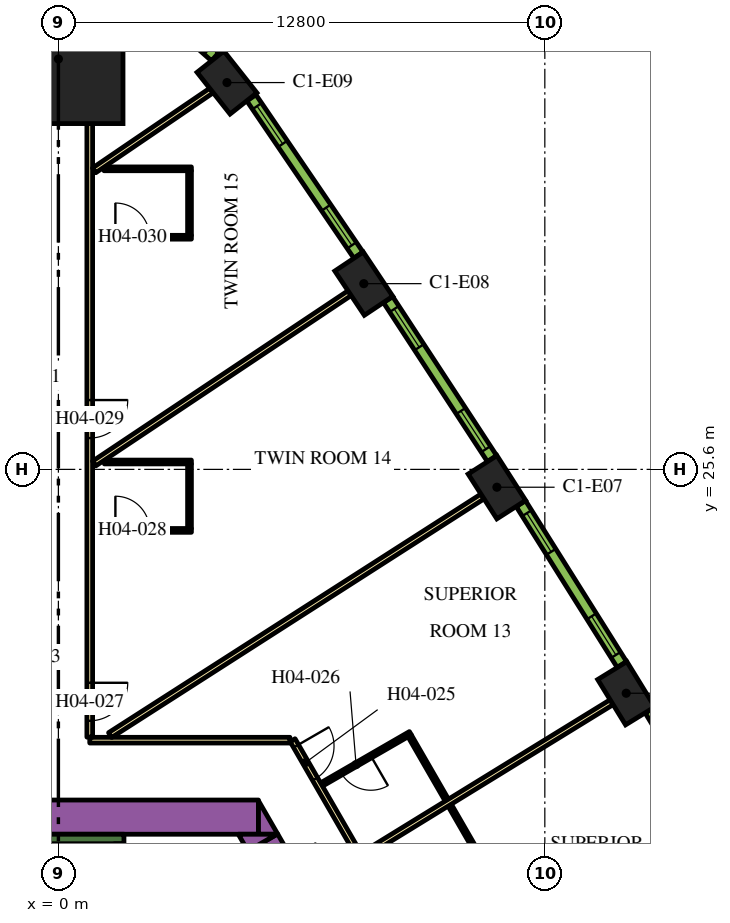
"""IFC4 building model, lengths in metres.
Left out: names, types, materials, properties, quantities, classifications, styles, units other than length and angle.
Written with IfcOpenShell. Run it as: python <this file> out.ifc"""

import sys

from ifc_helpers import new_model, si_unit, direction, frame, frame_2d, origin, origin_2d, place, context, subcontext, project, spatial, polyline, rectangle, outline, extrude, element, fill, save


model = new_model("IFC4")
c1 = context("Model", 3, precision=1e-05, world=origin(), true_north=direction((0.0, 1.0)))
c2 = subcontext(c1, "Body", "Model", "MODEL_VIEW")
j1 = project(units=[si_unit("LENGTHUNIT", "METRE"), si_unit("PLANEANGLEUNIT", "RADIAN")], contexts=[c1])
p1 = place(None, origin())
s1 = spatial("IfcSite", under=j1, at=p1, CompositionType="ELEMENT")
p2 = place(p1, origin())
s2 = spatial("IfcBuilding", under=s1, at=p2, CompositionType="ELEMENT")
p3 = place(p2, frame((0.0, 0.0, 70.5)))
s3 = spatial("IfcBuildingStorey", under=s2, at=p3, CompositionType="ELEMENT", Elevation=70.5)
p4 = place(p3, frame((0.0, 36.399, 0.0), z_axis=(0.0, 0.0, 1.0), x_axis=(0.0, 1.0, 0.0)))
e1 = element("IfcColumn", 1, at=p4, inside=s3, PredefinedType="COLUMN", context=c2, shape_type="SweptSolid", body=[
    extrude(rectangle(XDim=3.4, YDim=3.4, at=origin_2d()), origin(), (0.0, 0.0, 1.0), 3.9),
])
for number, where, z_axis, x_axis in (
    (2, (14.942, 19.71, 0.0), (0.0, 0.0, 1.0), (-0.524, 0.852, 0.0)),
    (3, (11.539, 25.131, 0.0), (0.0, 0.0, 1.0), (-0.539, 0.842, 0.0)),
    (4, (8.037, 30.487, 0.0), (0.0, 0.0, 1.0), (-0.555, 0.832, 0.0)),
    (5, (4.436, 35.778, 0.0), (0.0, 0.0, 1.0), (-0.62, 0.784, 0.0)),
):
    element("IfcColumn", number, at=place(p3, frame(where, z_axis=z_axis, x_axis=x_axis)), inside=s3, PredefinedType="COLUMN", context=c2, shape_type="SweptSolid", body=[
        extrude(rectangle(XDim=1.4, YDim=0.9, at=origin_2d()), origin(), (0.0, 0.0, 1.0), 3.9),
    ])
p5 = place(p3, frame((-4.224, 16.45, 0.0), z_axis=(0.0, 0.0, 1.0), x_axis=(1.0, 0.0, 0.0)))
e6 = element("IfcWall", 6, at=p5, inside=s3, PredefinedType="SOLIDWALL", context=c2, shape_type="SweptSolid", body=[
    extrude(rectangle(XDim=9.488, YDim=0.9, at=frame_2d((4.744, 0.0))), origin(), (0.0, 0.0, 1.0), 3.9),
])
p6 = place(p3, origin())
e7 = element("IfcWall", 7, at=p6, inside=s3, PredefinedType="SOLIDWALL", context=c2, shape_type="SweptSolid", body=[
    extrude(outline(polyline([(5.265, 16.0), (5.265, 16.88), (5.773, 16.0), (5.265, 16.0)])), origin(), (0.0, 0.0, 1.0), 3.9),
])
p7 = place(p3, frame((5.611, 15.382, 0.0), z_axis=(0.0, 0.0, 1.0), x_axis=(-0.500102178127, 0.865966403178, 0.0)))
e8 = element("IfcWall", 8, at=p7, inside=s3, PredefinedType="SOLIDWALL", context=c2, shape_type="SweptSolid", body=[
    extrude(rectangle(XDim=0.464, YDim=0.9, at=frame_2d((0.232, 0.0))), origin(), (0.0, 0.0, 1.0), 3.9),
])
e9 = element("IfcWall", 9, at=p6, inside=s3, PredefinedType="SOLIDWALL", context=c2, shape_type="SweptSolid", body=[
    extrude(outline(polyline([(4.734, 16.0), (5.75, 16.0), (4.988, 15.56), (4.734, 16.0)])), origin(), (0.0, 0.0, 1.0), 3.9),
])
p8 = place(p3, frame((-1.725, 15.875, 0.0), z_axis=(0.0, 0.0, 1.0), x_axis=(1.0, 0.0, 0.0)))
e10 = element("IfcWall", 10, at=p8, inside=s3, PredefinedType="SOLIDWALL", context=c2, shape_type="SweptSolid", body=[
    extrude(rectangle(XDim=3.45, YDim=0.25, at=frame_2d((1.725, 0.0))), origin(), (0.0, 0.0, 1.0), 3.9),
])
p9 = place(p3, frame((6.163, 18.475, 0.0), z_axis=(0.0, 0.0, 1.0), x_axis=(0.500001317485, -0.866024643133, 0.0)))
e11 = element("IfcWall", 11, at=p9, inside=s3, PredefinedType="PARTITIONING", context=c2, shape_type="SweptSolid", body=[
    extrude(rectangle(XDim=25.767, YDim=0.15, at=frame_2d((12.883, 0.0))), origin(), (0.0, 0.0, 1.0), 2.75),
])
p10 = place(p9, frame((21.138, 0.0, 0.0)))
e12 = element("IfcOpeningElement", 12, at=p10, cuts=e11, PredefinedType="OPENING", context=c2, shape_type="SweptSolid", body=[
    extrude(rectangle(XDim=1.0, YDim=2.1, at=frame_2d((0.5, 1.05))), frame((0.0, 0.085, 0.0), z_axis=(0.0, -1.0, 0.0), x_axis=(1.0, 0.0, 0.0)), (0.0, 0.0, 1.0), 0.17),
])
p11 = place(p9, frame((9.948, 0.0, 0.0)))
e13 = element("IfcOpeningElement", 13, at=p11, cuts=e11, PredefinedType="OPENING", context=c2, shape_type="SweptSolid", body=[
    extrude(rectangle(XDim=1.1, YDim=2.1, at=frame_2d((0.55, 1.05))), frame((0.0, 0.085, 0.0), z_axis=(0.0, -1.0, 0.0), x_axis=(1.0, 0.0, 0.0)), (0.0, 0.0, 1.0), 0.17),
])
p12 = place(p9, frame((8.641, 0.0, 0.0)))
e14 = element("IfcOpeningElement", 14, at=p12, cuts=e11, PredefinedType="OPENING", context=c2, shape_type="SweptSolid", body=[
    extrude(rectangle(XDim=1.0, YDim=2.1, at=frame_2d((0.5, 1.05))), frame((0.0, 0.085, 0.0), z_axis=(0.0, -1.0, 0.0), x_axis=(1.0, 0.0, 0.0)), (0.0, 0.0, 1.0), 0.17),
])
p13 = place(p9, frame((0.18, 0.0, 0.0)))
e15 = element("IfcOpeningElement", 15, at=p13, cuts=e11, PredefinedType="OPENING", context=c2, shape_type="SweptSolid", body=[
    extrude(rectangle(XDim=1.0, YDim=2.1, at=frame_2d((0.5, 1.05))), frame((0.0, 0.085, 0.0), z_axis=(0.0, -1.0, 0.0), x_axis=(1.0, 0.0, 0.0)), (0.0, 0.0, 1.0), 0.17),
])
p14 = place(p3, frame((0.825, 18.475, 0.0), z_axis=(0.0, 0.0, 1.0), x_axis=(1.0, 0.0, 0.0)))
e16 = element("IfcWall", 16, at=p14, inside=s3, PredefinedType="PARTITIONING", context=c2, shape_type="SweptSolid", body=[
    extrude(rectangle(XDim=5.268, YDim=0.15, at=frame_2d((2.634, 0.0))), origin(), (0.0, 0.0, 1.0), 2.75),
])
p15 = place(p3, frame((0.825, 34.699, 0.0), z_axis=(0.0, 0.0, 1.0), x_axis=(0.0, -1.0, 0.0)))
e17 = element("IfcWall", 17, at=p15, inside=s3, PredefinedType="PARTITIONING", context=c2, shape_type="SweptSolid", body=[
    extrude(rectangle(XDim=16.144, YDim=0.15, at=frame_2d((8.072, 0.0))), origin(), (0.0, 0.0, 1.0), 2.75),
])
p16 = place(p15, frame((14.714, 0.0, 0.0)))
e18 = element("IfcOpeningElement", 18, at=p16, cuts=e17, PredefinedType="OPENING", context=c2, shape_type="SweptSolid", body=[
    extrude(rectangle(XDim=1.0, YDim=2.1, at=frame_2d((0.5, 1.05))), frame((0.0, 0.085, 0.0), z_axis=(0.0, -1.0, 0.0), x_axis=(1.0, 0.0, 0.0)), (0.0, 0.0, 1.0), 0.17),
])
p17 = place(p15, frame((7.275, 0.0, 0.0)))
e19 = element("IfcOpeningElement", 19, at=p17, cuts=e17, PredefinedType="OPENING", context=c2, shape_type="SweptSolid", body=[
    extrude(rectangle(XDim=1.0, YDim=2.1, at=frame_2d((0.5, 1.05))), frame((0.0, 0.085, 0.0), z_axis=(0.0, -1.0, 0.0), x_axis=(1.0, 0.0, 0.0)), (0.0, 0.0, 1.0), 0.17),
])
p18 = place(p3, frame((7.662, 30.238, 0.0), z_axis=(0.0, 0.0, 1.0), x_axis=(-0.831882886825, -0.554951225431, 0.0)))
e20 = element("IfcWall", 20, at=p18, inside=s3, PredefinedType="PARTITIONING", context=c2, shape_type="SweptSolid", body=[
    extrude(rectangle(XDim=8.079, YDim=0.15, at=frame_2d((4.04, 0.0))), origin(), (0.0, 0.0, 1.0), 2.75),
])
p19 = place(p3, frame((11.16, 24.888, 0.0), z_axis=(0.0, 0.0, 1.0), x_axis=(-0.84199813156, -0.539480441211, 0.0)))
e21 = element("IfcWall", 21, at=p19, inside=s3, PredefinedType="PARTITIONING", context=c2, shape_type="SweptSolid", body=[
    extrude(rectangle(XDim=11.638, YDim=0.15, at=frame_2d((5.819, 0.0))), origin(), (0.0, 0.0, 1.0), 2.75),
])
p20 = place(p3, frame((4.028, 35.569, 0.0), z_axis=(0.0, 0.0, 1.0), x_axis=(-0.826730622998, -0.562597971021, 0.0)))
e22 = element("IfcWall", 22, at=p20, inside=s3, PredefinedType="PARTITIONING", context=c2, shape_type="SweptSolid", body=[
    extrude(rectangle(XDim=3.733, YDim=0.15, at=frame_2d((1.867, 0.0))), origin(), (0.0, 0.0, 1.0), 2.75),
])
p21 = place(p3, frame((14.558, 19.475, 0.0), z_axis=(0.0, 0.0, 1.0), x_axis=(-0.851829455142, -0.523819223925, 0.0)))
e23 = element("IfcWall", 23, at=p21, inside=s3, PredefinedType="PARTITIONING", context=c2, shape_type="SweptSolid", body=[
    extrude(rectangle(XDim=7.688, YDim=0.15, at=frame_2d((3.844, 0.0))), origin(), (0.0, 0.0, 1.0), 2.75),
])
p22 = place(p3, frame((11.342, 14.955, 0.0), z_axis=(0.0, 0.0, 1.0), x_axis=(-0.500008976872, 0.866020220923, 0.0)))
e24 = element("IfcWall", 24, at=p22, inside=s3, PredefinedType="PARTITIONING", context=c2, shape_type="SweptSolid", body=[
    extrude(rectangle(XDim=2.09, YDim=0.1, at=frame_2d((1.045, 0.0))), origin(), (0.0, 0.0, 1.0), 2.75),
])
p23 = place(p3, frame((9.262, 18.658, 0.0), z_axis=(0.0, 0.0, 1.0), x_axis=(-0.866019956843, -0.50000943426, 0.0)))
e25 = element("IfcWall", 25, at=p23, inside=s3, PredefinedType="PARTITIONING", context=c2, shape_type="SweptSolid", body=[
    extrude(rectangle(XDim=2.7, YDim=0.1, at=frame_2d((1.35, 0.0))), origin(), (0.0, 0.0, 1.0), 2.75),
])
p24 = place(p23, frame((1.2, 0.0, 0.0)))
e26 = element("IfcOpeningElement", 26, at=p24, cuts=e25, PredefinedType="OPENING", context=c2, shape_type="SweptSolid", body=[
    extrude(rectangle(XDim=0.9, YDim=2.1, at=frame_2d((0.45, 1.05))), frame((0.0, 0.06, 0.0), z_axis=(0.0, -1.0, 0.0), x_axis=(1.0, 0.0, 0.0)), (0.0, 0.0, 1.0), 0.12),
])
p25 = place(p3, frame((9.244, 18.589, 0.0), z_axis=(0.0, 0.0, 1.0), x_axis=(0.500043961785, -0.866000020948, 0.0)))
e27 = element("IfcWall", 27, at=p25, inside=s3, PredefinedType="PARTITIONING", context=c2, shape_type="SweptSolid", body=[
    extrude(rectangle(XDim=1.95, YDim=0.1, at=frame_2d((0.975, 0.0))), origin(), (0.0, 0.0, 1.0), 2.75),
])
p26 = place(p3, frame((0.9, 23.994, 0.0), z_axis=(0.0, 0.0, 1.0), x_axis=(1.0, 0.0, 0.0)))
e28 = element("IfcWall", 28, at=p26, inside=s3, PredefinedType="PARTITIONING", context=c2, shape_type="SweptSolid", body=[
    extrude(rectangle(XDim=2.6, YDim=0.1, at=frame_2d((1.3, 0.0))), origin(), (0.0, 0.0, 1.0), 2.75),
])
p27 = place(p26, frame((0.6, 0.0, 0.0)))
e29 = element("IfcOpeningElement", 29, at=p27, cuts=e28, PredefinedType="OPENING", context=c2, shape_type="SweptSolid", body=[
    extrude(rectangle(XDim=0.9, YDim=2.1, at=frame_2d((0.45, 1.05))), frame((0.0, 0.06, 0.0), z_axis=(0.0, -1.0, 0.0), x_axis=(1.0, 0.0, 0.0)), (0.0, 0.0, 1.0), 0.12),
])
p28 = place(p3, frame((3.45, 24.044, 0.0), z_axis=(0.0, 0.0, 1.0), x_axis=(0.0, 1.0, 0.0)))
e30 = element("IfcWall", 30, at=p28, inside=s3, PredefinedType="PARTITIONING", context=c2, shape_type="SweptSolid", body=[
    extrude(rectangle(XDim=1.7, YDim=0.1, at=frame_2d((0.85, 0.0))), origin(), (0.0, 0.0, 1.0), 2.75),
])
p29 = place(p3, frame((1.21, 25.794, 0.0), z_axis=(0.0, 0.0, 1.0), x_axis=(1.0, 0.0, 0.0)))
e31 = element("IfcWall", 31, at=p29, inside=s3, PredefinedType="PARTITIONING", context=c2, shape_type="SweptSolid", body=[
    extrude(rectangle(XDim=2.29, YDim=0.1, at=frame_2d((1.145, 0.0))), origin(), (0.0, 0.0, 1.0), 2.75),
])
p30 = place(p3, frame((0.9, 31.708, 0.0), z_axis=(0.0, 0.0, 1.0), x_axis=(1.0, 0.0, 0.0)))
e32 = element("IfcWall", 32, at=p30, inside=s3, PredefinedType="PARTITIONING", context=c2, shape_type="SweptSolid", body=[
    extrude(rectangle(XDim=2.6, YDim=0.1, at=frame_2d((1.3, 0.0))), origin(), (0.0, 0.0, 1.0), 2.75),
])
p31 = place(p30, frame((0.6, 0.0, 0.0)))
e33 = element("IfcOpeningElement", 33, at=p31, cuts=e32, PredefinedType="OPENING", context=c2, shape_type="SweptSolid", body=[
    extrude(rectangle(XDim=0.9, YDim=2.1, at=frame_2d((0.45, 1.05))), frame((0.0, 0.06, 0.0), z_axis=(0.0, -1.0, 0.0), x_axis=(1.0, 0.0, 0.0)), (0.0, 0.0, 1.0), 0.12),
])
p32 = place(p3, frame((3.45, 31.759, 0.0), z_axis=(0.0, 0.0, 1.0), x_axis=(0.0, 1.0, 0.0)))
e34 = element("IfcWall", 34, at=p32, inside=s3, PredefinedType="PARTITIONING", context=c2, shape_type="SweptSolid", body=[
    extrude(rectangle(XDim=1.7, YDim=0.1, at=frame_2d((0.85, 0.0))), origin(), (0.0, 0.0, 1.0), 2.75),
])
p33 = place(p3, frame((1.2, 33.509, 0.0), z_axis=(0.0, 0.0, 1.0), x_axis=(1.0, 0.0, 0.0)))
e35 = element("IfcWall", 35, at=p33, inside=s3, PredefinedType="PARTITIONING", context=c2, shape_type="SweptSolid", body=[
    extrude(rectangle(XDim=2.3, YDim=0.1, at=frame_2d((1.15, 0.0))), origin(), (0.0, 0.0, 1.0), 2.75),
])
p34 = place(p3, frame((18.143, 14.986, 0.0), z_axis=(0.0, 0.0, 1.0), x_axis=(-0.515938796285, 0.856625448191, 0.0)))
e36 = element("IfcWall", 36, at=p34, inside=s3, PredefinedType="SOLIDWALL", context=c2, shape_type="SweptSolid", body=[
    extrude(rectangle(XDim=4.998, YDim=0.29, at=frame_2d((2.499, 0.0))), origin(), (0.0, 0.0, 1.0), 3.65),
])
p35 = place(p34, frame((0.297, 0.0, 0.9)))
e37 = element("IfcOpeningElement", 37, at=p35, cuts=e36, PredefinedType="OPENING", context=c2, shape_type="SweptSolid", body=[
    extrude(rectangle(XDim=1.2, YDim=2.15, at=frame_2d((0.6, 1.075))), frame((0.0, 0.155, 0.0), z_axis=(0.0, -1.0, 0.0), x_axis=(1.0, 0.0, 0.0)), (0.0, 0.0, 1.0), 0.31),
])
p36 = place(p34, frame((3.501, 0.0, 0.9)))
e38 = element("IfcOpeningElement", 38, at=p36, cuts=e36, PredefinedType="OPENING", context=c2, shape_type="SweptSolid", body=[
    extrude(rectangle(XDim=1.2, YDim=2.15, at=frame_2d((0.6, 1.075))), frame((0.0, 0.155, 0.0), z_axis=(0.0, -1.0, 0.0), x_axis=(1.0, 0.0, 0.0)), (0.0, 0.0, 1.0), 0.31),
])
p37 = place(p3, frame((14.827, 20.466, 0.0), z_axis=(0.0, 0.0, 1.0), x_axis=(-0.531688286542, 0.846940119462, 0.0)))
e39 = element("IfcWall", 39, at=p37, inside=s3, PredefinedType="SOLIDWALL", context=c2, shape_type="SweptSolid", body=[
    extrude(rectangle(XDim=4.998, YDim=0.29, at=frame_2d((2.499, 0.0))), origin(), (0.0, 0.0, 1.0), 3.65),
])
p38 = place(p37, frame((0.297, 0.0, 0.9)))
e40 = element("IfcOpeningElement", 40, at=p38, cuts=e39, PredefinedType="OPENING", context=c2, shape_type="SweptSolid", body=[
    extrude(rectangle(XDim=1.2, YDim=2.15, at=frame_2d((0.6, 1.075))), frame((0.0, 0.155, 0.0), z_axis=(0.0, -1.0, 0.0), x_axis=(1.0, 0.0, 0.0)), (0.0, 0.0, 1.0), 0.31),
])
p39 = place(p37, frame((3.501, 0.0, 0.9)))
e41 = element("IfcOpeningElement", 41, at=p39, cuts=e39, PredefinedType="OPENING", context=c2, shape_type="SweptSolid", body=[
    extrude(rectangle(XDim=1.2, YDim=2.15, at=frame_2d((0.6, 1.075))), frame((0.0, 0.155, 0.0), z_axis=(0.0, -1.0, 0.0), x_axis=(1.0, 0.0, 0.0)), (0.0, 0.0, 1.0), 0.31),
])
p40 = place(p3, frame((11.411, 25.884, 0.0), z_axis=(0.0, 0.0, 1.0), x_axis=(-0.547204617628, 0.836998868845, 0.0)))
e42 = element("IfcWall", 42, at=p40, inside=s3, PredefinedType="SOLIDWALL", context=c2, shape_type="SweptSolid", body=[
    extrude(rectangle(XDim=4.998, YDim=0.29, at=frame_2d((2.499, 0.0))), origin(), (0.0, 0.0, 1.0), 3.65),
])
p41 = place(p40, frame((0.297, 0.0, 0.9)))
e43 = element("IfcOpeningElement", 43, at=p41, cuts=e42, PredefinedType="OPENING", context=c2, shape_type="SweptSolid", body=[
    extrude(rectangle(XDim=1.2, YDim=2.15, at=frame_2d((0.6, 1.075))), frame((0.0, 0.155, 0.0), z_axis=(0.0, -1.0, 0.0), x_axis=(1.0, 0.0, 0.0)), (0.0, 0.0, 1.0), 0.31),
])
p42 = place(p40, frame((3.501, 0.0, 0.9)))
e44 = element("IfcOpeningElement", 44, at=p42, cuts=e42, PredefinedType="OPENING", context=c2, shape_type="SweptSolid", body=[
    extrude(rectangle(XDim=1.2, YDim=2.15, at=frame_2d((0.6, 1.075))), frame((0.0, 0.155, 0.0), z_axis=(0.0, -1.0, 0.0), x_axis=(1.0, 0.0, 0.0)), (0.0, 0.0, 1.0), 0.31),
])
p43 = place(p3, frame((7.895, 31.238, 0.0), z_axis=(0.0, 0.0, 1.0), x_axis=(-0.562610153679, 0.826722332454, 0.0)))
e45 = element("IfcWall", 45, at=p43, inside=s3, PredefinedType="SOLIDWALL", context=c2, shape_type="SweptSolid", body=[
    extrude(rectangle(XDim=5.006, YDim=0.29, at=frame_2d((2.503, 0.0))), origin(), (0.0, 0.0, 1.0), 3.65),
])
p44 = place(p43, frame((0.31, 0.0, 0.9)))
e46 = element("IfcOpeningElement", 46, at=p44, cuts=e45, PredefinedType="OPENING", context=c2, shape_type="SweptSolid", body=[
    extrude(rectangle(XDim=1.2, YDim=2.15, at=frame_2d((0.6, 1.075))), frame((0.0, 0.155, 0.0), z_axis=(0.0, -1.0, 0.0), x_axis=(1.0, 0.0, 0.0)), (0.0, 0.0, 1.0), 0.31),
])
p45 = place(p43, frame((3.541, 0.0, 0.9)))
e47 = element("IfcOpeningElement", 47, at=p45, cuts=e45, PredefinedType="OPENING", context=c2, shape_type="SweptSolid", body=[
    extrude(rectangle(XDim=1.2, YDim=2.15, at=frame_2d((0.6, 1.075))), frame((0.0, 0.155, 0.0), z_axis=(0.0, -1.0, 0.0), x_axis=(1.0, 0.0, 0.0)), (0.0, 0.0, 1.0), 0.31),
])
p46 = place(p3, frame((4.125, 36.459, 0.0), z_axis=(0.0, 0.0, 1.0), x_axis=(-0.749812680302, 0.661650167731, 0.0)))
e48 = element("IfcWall", 48, at=p46, inside=s3, PredefinedType="SOLIDWALL", context=c2, shape_type="SweptSolid", body=[
    extrude(rectangle(XDim=1.415, YDim=0.29, at=frame_2d((0.708, 0.0))), origin(), (0.0, 0.0, 1.0), 3.65),
])
p47 = place(p46, frame((0.258, 0.0, 0.9)))
e49 = element("IfcOpeningElement", 49, at=p47, cuts=e48, PredefinedType="OPENING", context=c2, shape_type="SweptSolid", body=[
    extrude(rectangle(XDim=0.9, YDim=2.15, at=frame_2d((0.45, 1.075))), frame((0.0, 0.155, 0.0), z_axis=(0.0, -1.0, 0.0), x_axis=(1.0, 0.0, 0.0)), (0.0, 0.0, 1.0), 0.31),
])
p48 = place(p13, origin())
e50 = element("IfcDoor", 50, at=p48, inside=s3, OperationType="SINGLE_SWING_LEFT", PredefinedType="DOOR", context=c2, shape_type="SweptSolid", body=[
    extrude(rectangle(XDim=1.0, YDim=2.1, at=frame_2d((0.5, 1.05))), frame((0.0, 0.025, 0.0), z_axis=(0.0, -1.0, 0.0), x_axis=(1.0, 0.0, 0.0)), (0.0, 0.0, 1.0), 0.05),
])
fill(e15, e50)
p49 = place(p24, origin())
e51 = element("IfcDoor", 51, at=p49, inside=s3, OperationType="SINGLE_SWING_LEFT", PredefinedType="DOOR", context=c2, shape_type="SweptSolid", body=[
    extrude(rectangle(XDim=0.9, YDim=2.1, at=frame_2d((0.45, 1.05))), frame((0.0, 0.025, 0.0), z_axis=(0.0, -1.0, 0.0), x_axis=(1.0, 0.0, 0.0)), (0.0, 0.0, 1.0), 0.05),
])
fill(e26, e51)
p50 = place(p16, origin())
e52 = element("IfcDoor", 52, at=p50, inside=s3, OperationType="SINGLE_SWING_RIGHT", PredefinedType="DOOR", context=c2, shape_type="SweptSolid", body=[
    extrude(rectangle(XDim=1.0, YDim=2.1, at=frame_2d((0.5, 1.05))), frame((0.0, 0.025, 0.0), z_axis=(0.0, -1.0, 0.0), x_axis=(1.0, 0.0, 0.0)), (0.0, 0.0, 1.0), 0.05),
])
fill(e18, e52)
p51 = place(p27, origin())
e53 = element("IfcDoor", 53, at=p51, inside=s3, OperationType="SINGLE_SWING_LEFT", PredefinedType="DOOR", context=c2, shape_type="SweptSolid", body=[
    extrude(rectangle(XDim=0.9, YDim=2.1, at=frame_2d((0.45, 1.05))), frame((0.0, 0.025, 0.0), z_axis=(0.0, -1.0, 0.0), x_axis=(1.0, 0.0, 0.0)), (0.0, 0.0, 1.0), 0.05),
])
fill(e29, e53)
p52 = place(p17, origin())
e54 = element("IfcDoor", 54, at=p52, inside=s3, OperationType="SINGLE_SWING_RIGHT", PredefinedType="DOOR", context=c2, shape_type="SweptSolid", body=[
    extrude(rectangle(XDim=1.0, YDim=2.1, at=frame_2d((0.5, 1.05))), frame((0.0, 0.025, 0.0), z_axis=(0.0, -1.0, 0.0), x_axis=(1.0, 0.0, 0.0)), (0.0, 0.0, 1.0), 0.05),
])
fill(e19, e54)
p53 = place(p31, origin())
e55 = element("IfcDoor", 55, at=p53, inside=s3, OperationType="SINGLE_SWING_RIGHT", PredefinedType="DOOR", context=c2, shape_type="SweptSolid", body=[
    extrude(rectangle(XDim=0.9, YDim=2.1, at=frame_2d((0.45, 1.05))), frame((0.0, 0.025, 0.0), z_axis=(0.0, -1.0, 0.0), x_axis=(1.0, 0.0, 0.0)), (0.0, 0.0, 1.0), 0.05),
])
fill(e33, e55)
p54 = place(p38, origin())
e56 = element("IfcWindow", 56, at=p54, inside=s3, PartitioningType="DOUBLE_PANEL_VERTICAL", PredefinedType="WINDOW", context=c2, shape_type="SweptSolid", body=[
    extrude(rectangle(XDim=1.2, YDim=2.15, at=frame_2d((0.6, 1.075))), frame((0.0, 0.015, 0.0), z_axis=(0.0, -1.0, 0.0), x_axis=(1.0, 0.0, 0.0)), (0.0, 0.0, 1.0), 0.06),
])
fill(e40, e56)
p55 = place(p39, origin())
e57 = element("IfcWindow", 57, at=p55, inside=s3, PartitioningType="DOUBLE_PANEL_VERTICAL", PredefinedType="WINDOW", context=c2, shape_type="SweptSolid", body=[
    extrude(rectangle(XDim=1.2, YDim=2.15, at=frame_2d((0.6, 1.075))), frame((0.0, 0.015, 0.0), z_axis=(0.0, -1.0, 0.0), x_axis=(1.0, 0.0, 0.0)), (0.0, 0.0, 1.0), 0.06),
])
fill(e41, e57)
p56 = place(p41, origin())
e58 = element("IfcWindow", 58, at=p56, inside=s3, PartitioningType="DOUBLE_PANEL_VERTICAL", PredefinedType="WINDOW", context=c2, shape_type="SweptSolid", body=[
    extrude(rectangle(XDim=1.2, YDim=2.15, at=frame_2d((0.6, 1.075))), frame((0.0, 0.015, 0.0), z_axis=(0.0, -1.0, 0.0), x_axis=(1.0, 0.0, 0.0)), (0.0, 0.0, 1.0), 0.06),
])
fill(e43, e58)
p57 = place(p42, origin())
e59 = element("IfcWindow", 59, at=p57, inside=s3, PartitioningType="DOUBLE_PANEL_VERTICAL", PredefinedType="WINDOW", context=c2, shape_type="SweptSolid", body=[
    extrude(rectangle(XDim=1.2, YDim=2.15, at=frame_2d((0.6, 1.075))), frame((0.0, 0.015, 0.0), z_axis=(0.0, -1.0, 0.0), x_axis=(1.0, 0.0, 0.0)), (0.0, 0.0, 1.0), 0.06),
])
fill(e44, e59)
p58 = place(p44, origin())
e60 = element("IfcWindow", 60, at=p58, inside=s3, PartitioningType="DOUBLE_PANEL_VERTICAL", PredefinedType="WINDOW", context=c2, shape_type="SweptSolid", body=[
    extrude(rectangle(XDim=1.2, YDim=2.15, at=frame_2d((0.6, 1.075))), frame((0.0, 0.015, 0.0), z_axis=(0.0, -1.0, 0.0), x_axis=(1.0, 0.0, 0.0)), (0.0, 0.0, 1.0), 0.06),
])
fill(e46, e60)
p59 = place(p45, origin())
e61 = element("IfcWindow", 61, at=p59, inside=s3, PartitioningType="DOUBLE_PANEL_VERTICAL", PredefinedType="WINDOW", context=c2, shape_type="SweptSolid", body=[
    extrude(rectangle(XDim=1.2, YDim=2.15, at=frame_2d((0.6, 1.075))), frame((0.0, 0.015, 0.0), z_axis=(0.0, -1.0, 0.0), x_axis=(1.0, 0.0, 0.0)), (0.0, 0.0, 1.0), 0.06),
])
fill(e47, e61)
save(model, sys.argv[1])
